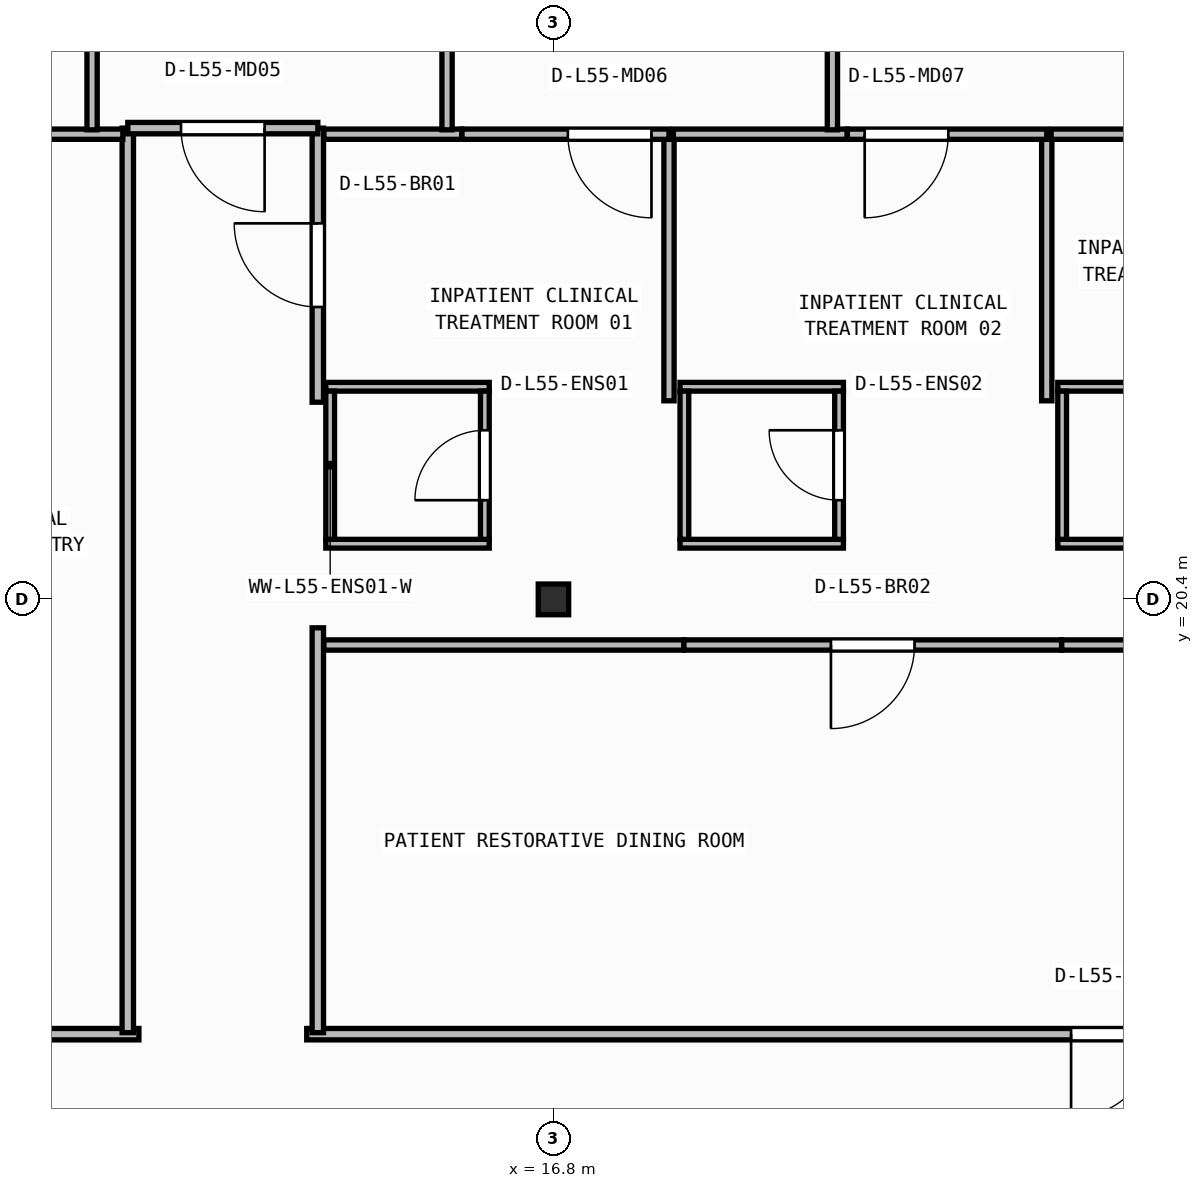
"""IFC4 building model, lengths in metres.
Left out: names, types, materials, properties, quantities, classifications, styles, units other than length and angle.
Written with IfcOpenShell. Run it as: python <this file> out.ifc"""

import sys

from ifc_helpers import new_model, si_unit, direction, frame, frame_2d, origin, origin_2d, place, context, subcontext, project, spatial, rectangle, i_section, extrude, element, fill, save


model = new_model("IFC4")
c1 = context("Model", 3, precision=1e-05, world=origin(), true_north=direction((0.0, 1.0)))
c2 = subcontext(c1, "Body", "Model", "MODEL_VIEW")
j1 = project(units=[si_unit("LENGTHUNIT", "METRE"), si_unit("PLANEANGLEUNIT", "RADIAN")], contexts=[c1])
p1 = place(None, origin())
s1 = spatial("IfcSite", under=j1, at=p1, CompositionType="ELEMENT")
p2 = place(p1, origin())
s2 = spatial("IfcBuilding", under=s1, at=p2, CompositionType="ELEMENT")
p3 = place(p2, frame((0.0, 0.0, 223.7)))
s3 = spatial("IfcBuildingStorey", under=s2, at=p3, CompositionType="ELEMENT", Elevation=223.7)
p4 = place(p3, frame((16.8, 20.4, 0.0), z_axis=(0.0, 0.0, 1.0), x_axis=(1.0, 0.0, 0.0)))
e1 = element("IfcColumn", 1, at=p4, inside=s3, PredefinedType="COLUMN", context=c2, shape_type="SweptSolid", body=[
    extrude(i_section(OverallWidth=0.4, OverallDepth=0.404, WebThickness=0.02, FlangeThickness=0.032, at=origin_2d()), origin(), (0.0, 0.0, 1.0), 3.95),
])
for number, where, z_axis, x_axis in (
    (2, (13.805, 21.133, 0.0), (0.0, 0.0, 1.0), (1.0, 0.0, 0.0)),
    (3, (13.805, 23.198, 0.0), (0.0, 0.0, 1.0), (1.0, 0.0, 0.0)),
):
    element("IfcWall", number, at=place(p3, frame(where, z_axis=z_axis, x_axis=x_axis)), inside=s3, PredefinedType="PARTITIONING", context=c2, shape_type="SweptSolid", body=[
        extrude(rectangle(XDim=2.15, YDim=0.115, at=frame_2d((1.075, 0.0))), origin(), (0.0, 0.0, 1.0), 3.71),
    ])
p5 = place(p3, frame((13.863, 21.19, 0.0), z_axis=(0.0, 0.0, 1.0), x_axis=(0.0, 1.0, 0.0)))
e4 = element("IfcWall", 4, at=p5, inside=s3, PredefinedType="PARTITIONING", context=c2, shape_type="SweptSolid", body=[
    extrude(rectangle(XDim=1.95, YDim=0.115, at=frame_2d((0.975, 0.0))), origin(), (0.0, 0.0, 1.0), 3.71),
])
p6 = place(p3, frame((15.897, 21.19, 0.0), z_axis=(0.0, 0.0, 1.0), x_axis=(0.0, 1.0, 0.0)))
e5 = element("IfcWall", 5, at=p6, inside=s3, PredefinedType="PARTITIONING", context=c2, shape_type="SweptSolid", body=[
    extrude(rectangle(XDim=1.95, YDim=0.115, at=frame_2d((0.975, 0.0))), origin(), (0.0, 0.0, 1.0), 3.71),
])
p7 = place(p6, frame((0.515, 0.0, 0.0)))
e6 = element("IfcOpeningElement", 6, at=p7, cuts=e5, PredefinedType="OPENING", context=c2, shape_type="SweptSolid", body=[
    extrude(rectangle(XDim=0.92, YDim=2.1, at=frame_2d((0.46, 1.05))), frame((0.0, 0.067, 0.0), z_axis=(0.0, -1.0, 0.0), x_axis=(1.0, 0.0, 0.0)), (0.0, 0.0, 1.0), 0.135),
])
for number, where, z_axis, x_axis in (
    (7, (18.465, 21.133, 0.0), (0.0, 0.0, 1.0), (1.0, 0.0, 0.0)),
    (8, (18.465, 23.198, 0.0), (0.0, 0.0, 1.0), (1.0, 0.0, 0.0)),
):
    element("IfcWall", number, at=place(p3, frame(where, z_axis=z_axis, x_axis=x_axis)), inside=s3, PredefinedType="PARTITIONING", context=c2, shape_type="SweptSolid", body=[
        extrude(rectangle(XDim=2.15, YDim=0.115, at=frame_2d((1.075, 0.0))), origin(), (0.0, 0.0, 1.0), 3.71),
    ])
p8 = place(p3, frame((18.522, 21.19, 0.0), z_axis=(0.0, 0.0, 1.0), x_axis=(0.0, 1.0, 0.0)))
e9 = element("IfcWall", 9, at=p8, inside=s3, PredefinedType="PARTITIONING", context=c2, shape_type="SweptSolid", body=[
    extrude(rectangle(XDim=1.95, YDim=0.115, at=frame_2d((0.975, 0.0))), origin(), (0.0, 0.0, 1.0), 3.71),
])
p9 = place(p3, frame((20.558, 21.19, 0.0), z_axis=(0.0, 0.0, 1.0), x_axis=(0.0, 1.0, 0.0)))
e10 = element("IfcWall", 10, at=p9, inside=s3, PredefinedType="PARTITIONING", context=c2, shape_type="SweptSolid", body=[
    extrude(rectangle(XDim=1.95, YDim=0.115, at=frame_2d((0.975, 0.0))), origin(), (0.0, 0.0, 1.0), 3.71),
])
p10 = place(p9, frame((0.515, 0.0, 0.0)))
e11 = element("IfcOpeningElement", 11, at=p10, cuts=e10, PredefinedType="OPENING", context=c2, shape_type="SweptSolid", body=[
    extrude(rectangle(XDim=0.92, YDim=2.1, at=frame_2d((0.46, 1.05))), frame((0.0, 0.067, 0.0), z_axis=(0.0, -1.0, 0.0), x_axis=(1.0, 0.0, 0.0)), (0.0, 0.0, 1.0), 0.135),
])
for number, where, z_axis, x_axis in (
    (12, (23.435, 21.133, 0.0), (0.0, 0.0, 1.0), (1.0, 0.0, 0.0)),
    (13, (23.435, 23.198, 0.0), (0.0, 0.0, 1.0), (1.0, 0.0, 0.0)),
):
    element("IfcWall", number, at=place(p3, frame(where, z_axis=z_axis, x_axis=x_axis)), inside=s3, PredefinedType="PARTITIONING", context=c2, shape_type="SweptSolid", body=[
        extrude(rectangle(XDim=2.15, YDim=0.115, at=frame_2d((1.075, 0.0))), origin(), (0.0, 0.0, 1.0), 3.71),
    ])
p11 = place(p3, frame((23.492, 21.19, 0.0), z_axis=(0.0, 0.0, 1.0), x_axis=(0.0, 1.0, 0.0)))
e14 = element("IfcWall", 14, at=p11, inside=s3, PredefinedType="PARTITIONING", context=c2, shape_type="SweptSolid", body=[
    extrude(rectangle(XDim=1.95, YDim=0.115, at=frame_2d((0.975, 0.0))), origin(), (0.0, 0.0, 1.0), 3.71),
])
p12 = place(p3, frame((11.346, 14.68, 0.0), z_axis=(0.0, 0.0, 1.0), x_axis=(-1.0, 0.0, 0.0)))
e15 = element("IfcWall", 15, at=p12, inside=s3, PredefinedType="PARTITIONING", context=c2, shape_type="SweptSolid", body=[
    extrude(rectangle(XDim=3.872, YDim=0.15, at=frame_2d((1.936, 0.0))), origin(), (0.0, 0.0, 1.0), 3.71),
])
p13 = place(p12, frame((1.386, 0.0, 0.0)))
e16 = element("IfcOpeningElement", 16, at=p13, cuts=e15, PredefinedType="OPENING", context=c2, shape_type="SweptSolid", body=[
    extrude(rectangle(XDim=1.1, YDim=2.1, at=frame_2d((0.55, 1.05))), frame((0.0, 0.085, 0.0), z_axis=(0.0, -1.0, 0.0), x_axis=(1.0, 0.0, 0.0)), (0.0, 0.0, 1.0), 0.17),
])
p14 = place(p3, frame((34.766, 14.68, 0.0), z_axis=(0.0, 0.0, 1.0), x_axis=(-1.0, 0.0, 0.0)))
e17 = element("IfcWall", 17, at=p14, inside=s3, PredefinedType="PARTITIONING", context=c2, shape_type="SweptSolid", body=[
    extrude(rectangle(XDim=21.212, YDim=0.15, at=frame_2d((10.606, 0.0))), origin(), (0.0, 0.0, 1.0), 3.71),
])
p15 = place(p14, frame((10.056, 0.0, 0.0)))
e18 = element("IfcOpeningElement", 18, at=p15, cuts=e17, PredefinedType="OPENING", context=c2, shape_type="SweptSolid", body=[
    extrude(rectangle(XDim=1.1, YDim=2.1, at=frame_2d((0.55, 1.05))), frame((0.0, 0.085, 0.0), z_axis=(0.0, -1.0, 0.0), x_axis=(1.0, 0.0, 0.0)), (0.0, 0.0, 1.0), 0.17),
])
p16 = place(p3, frame((11.2, 26.6, 0.0), z_axis=(0.0, 0.0, 1.0), x_axis=(0.0, -1.0, 0.0)))
e19 = element("IfcWall", 19, at=p16, inside=s3, PredefinedType="PARTITIONING", context=c2, shape_type="SweptSolid", body=[
    extrude(rectangle(XDim=11.9, YDim=0.15, at=frame_2d((5.95, 0.0))), origin(), (0.0, 0.0, 1.0), 3.71),
])
p17 = place(p3, frame((13.7, 14.7, 0.0), z_axis=(0.0, 0.0, 1.0), x_axis=(0.0, 1.0, 0.0)))
e20 = element("IfcWall", 20, at=p17, inside=s3, PredefinedType="PARTITIONING", context=c2, shape_type="SweptSolid", body=[
    extrude(rectangle(XDim=5.326, YDim=0.15, at=frame_2d((2.663, 0.0))), origin(), (0.0, 0.0, 1.0), 3.71),
])
p18 = place(p3, frame((13.7, 22.994, 0.0), z_axis=(0.0, 0.0, 1.0), x_axis=(0.0, 1.0, 0.0)))
e21 = element("IfcWall", 21, at=p18, inside=s3, PredefinedType="PARTITIONING", context=c2, shape_type="SweptSolid", body=[
    extrude(rectangle(XDim=3.606, YDim=0.15, at=frame_2d((1.803, 0.0))), origin(), (0.0, 0.0, 1.0), 3.71),
])
p19 = place(p18, frame((1.253, 0.0, 0.0)))
e22 = element("IfcOpeningElement", 22, at=p19, cuts=e21, PredefinedType="OPENING", context=c2, shape_type="SweptSolid", body=[
    extrude(rectangle(XDim=1.1, YDim=2.1, at=frame_2d((0.55, 1.05))), frame((0.0, 0.085, 0.0), z_axis=(0.0, -1.0, 0.0), x_axis=(1.0, 0.0, 0.0)), (0.0, 0.0, 1.0), 0.17),
])
p20 = place(p3, frame((13.7, 26.6, 0.0), z_axis=(0.0, 0.0, 1.0), x_axis=(-1.0, 0.0, 0.0)))
e23 = element("IfcWall", 23, at=p20, inside=s3, PredefinedType="PARTITIONING", context=c2, shape_type="SweptSolid", body=[
    extrude(rectangle(XDim=2.5, YDim=0.15, at=frame_2d((1.25, 0.0))), origin(), (0.0, 0.0, 1.0), 3.71),
])
p21 = place(p20, frame((0.7, 0.0, 0.0)))
e24 = element("IfcOpeningElement", 24, at=p21, cuts=e23, PredefinedType="OPENING", context=c2, shape_type="SweptSolid", body=[
    extrude(rectangle(XDim=1.1, YDim=2.1, at=frame_2d((0.55, 1.05))), frame((0.0, 0.085, 0.0), z_axis=(0.0, -1.0, 0.0), x_axis=(1.0, 0.0, 0.0)), (0.0, 0.0, 1.0), 0.17),
])
p22 = place(p3, frame((11.135, 26.52, 0.0), z_axis=(0.0, 0.0, 1.0), x_axis=(-1.0, 0.0, 0.0)))
e25 = element("IfcWall", 25, at=p22, inside=s3, PredefinedType="PARTITIONING", context=c2, shape_type="SweptSolid", body=[
    extrude(rectangle(XDim=3.498, YDim=0.135, at=frame_2d((1.749, 0.0))), origin(), (0.0, 0.0, 1.0), 3.71),
])
p23 = place(p3, frame((18.515, 19.8, 0.0), z_axis=(0.0, 0.0, 1.0), x_axis=(-1.0, 0.0, 0.0)))
e26 = element("IfcWall", 26, at=p23, inside=s3, PredefinedType="PARTITIONING", context=c2, shape_type="SweptSolid", body=[
    extrude(rectangle(XDim=4.735, YDim=0.135, at=frame_2d((2.367, 0.0))), origin(), (0.0, 0.0, 1.0), 3.71),
])
p24 = place(p3, frame((23.485, 19.8, 0.0), z_axis=(0.0, 0.0, 1.0), x_axis=(-1.0, 0.0, 0.0)))
e27 = element("IfcWall", 27, at=p24, inside=s3, PredefinedType="PARTITIONING", context=c2, shape_type="SweptSolid", body=[
    extrude(rectangle(XDim=4.968, YDim=0.135, at=frame_2d((2.484, 0.0))), origin(), (0.0, 0.0, 1.0), 3.71),
])
p25 = place(p24, frame((1.934, 0.0, 0.0)))
e28 = element("IfcOpeningElement", 28, at=p25, cuts=e27, PredefinedType="OPENING", context=c2, shape_type="SweptSolid", body=[
    extrude(rectangle(XDim=1.1, YDim=2.1, at=frame_2d((0.55, 1.05))), frame((0.0, 0.077, 0.0), z_axis=(0.0, -1.0, 0.0), x_axis=(1.0, 0.0, 0.0)), (0.0, 0.0, 1.0), 0.155),
])
p26 = place(p3, frame((27.715, 19.8, 0.0), z_axis=(0.0, 0.0, 1.0), x_axis=(-1.0, 0.0, 0.0)))
e29 = element("IfcWall", 29, at=p26, inside=s3, PredefinedType="PARTITIONING", context=c2, shape_type="SweptSolid", body=[
    extrude(rectangle(XDim=4.228, YDim=0.135, at=frame_2d((2.114, 0.0))), origin(), (0.0, 0.0, 1.0), 3.71),
])
p27 = place(p26, frame((0.271, 0.0, 0.0)))
e30 = element("IfcOpeningElement", 30, at=p27, cuts=e29, PredefinedType="OPENING", context=c2, shape_type="SweptSolid", body=[
    extrude(rectangle(XDim=0.98, YDim=2.1, at=frame_2d((0.49, 1.05))), frame((0.0, 0.077, 0.0), z_axis=(0.0, -1.0, 0.0), x_axis=(1.0, 0.0, 0.0)), (0.0, 0.0, 1.0), 0.155),
])
p28 = place(p3, frame((18.32, 23.012, 0.0), z_axis=(0.0, 0.0, 1.0), x_axis=(0.0, 1.0, 0.0)))
e31 = element("IfcWall", 31, at=p28, inside=s3, PredefinedType="PARTITIONING", context=c2, shape_type="SweptSolid", body=[
    extrude(rectangle(XDim=3.508, YDim=0.135, at=frame_2d((1.754, 0.0))), origin(), (0.0, 0.0, 1.0), 3.71),
])
p29 = place(p3, frame((15.594, 26.52, 0.0), z_axis=(0.0, 0.0, 1.0), x_axis=(-1.0, 0.0, 0.0)))
e32 = element("IfcWall", 32, at=p29, inside=s3, PredefinedType="PARTITIONING", context=c2, shape_type="SweptSolid", body=[
    extrude(rectangle(XDim=1.814, YDim=0.135, at=frame_2d((0.907, 0.0))), origin(), (0.0, 0.0, 1.0), 3.71),
])
p30 = place(p3, frame((18.32, 26.52, 0.0), z_axis=(0.0, 0.0, 1.0), x_axis=(-1.0, 0.0, 0.0)))
e33 = element("IfcWall", 33, at=p30, inside=s3, PredefinedType="PARTITIONING", context=c2, shape_type="SweptSolid", body=[
    extrude(rectangle(XDim=2.723, YDim=0.135, at=frame_2d((1.362, 0.0))), origin(), (0.0, 0.0, 1.0), 3.71),
])
p31 = place(p30, frame((0.231, 0.0, 0.0)))
e34 = element("IfcOpeningElement", 34, at=p31, cuts=e33, PredefinedType="OPENING", context=c2, shape_type="SweptSolid", body=[
    extrude(rectangle(XDim=1.1, YDim=2.1, at=frame_2d((0.55, 1.05))), frame((0.0, 0.077, 0.0), z_axis=(0.0, -1.0, 0.0), x_axis=(1.0, 0.0, 0.0)), (0.0, 0.0, 1.0), 0.155),
])
p32 = place(p3, frame((23.29, 23.012, 0.0), z_axis=(0.0, 0.0, 1.0), x_axis=(0.0, 1.0, 0.0)))
e35 = element("IfcWall", 35, at=p32, inside=s3, PredefinedType="PARTITIONING", context=c2, shape_type="SweptSolid", body=[
    extrude(rectangle(XDim=3.508, YDim=0.135, at=frame_2d((1.754, 0.0))), origin(), (0.0, 0.0, 1.0), 3.71),
])
p33 = place(p3, frame((20.665, 26.52, 0.0), z_axis=(0.0, 0.0, 1.0), x_axis=(-1.0, 0.0, 0.0)))
e36 = element("IfcWall", 36, at=p33, inside=s3, PredefinedType="PARTITIONING", context=c2, shape_type="SweptSolid", body=[
    extrude(rectangle(XDim=2.287, YDim=0.135, at=frame_2d((1.144, 0.0))), origin(), (0.0, 0.0, 1.0), 3.71),
])
p34 = place(p3, frame((23.29, 26.52, 0.0), z_axis=(0.0, 0.0, 1.0), x_axis=(-1.0, 0.0, 0.0)))
e37 = element("IfcWall", 37, at=p34, inside=s3, PredefinedType="PARTITIONING", context=c2, shape_type="SweptSolid", body=[
    extrude(rectangle(XDim=2.624, YDim=0.135, at=frame_2d((1.312, 0.0))), origin(), (0.0, 0.0, 1.0), 3.71),
])
p35 = place(p34, frame((1.295, 0.0, 0.0)))
e38 = element("IfcOpeningElement", 38, at=p35, cuts=e37, PredefinedType="OPENING", context=c2, shape_type="SweptSolid", body=[
    extrude(rectangle(XDim=1.1, YDim=2.1, at=frame_2d((0.55, 1.05))), frame((0.0, 0.077, 0.0), z_axis=(0.0, -1.0, 0.0), x_axis=(1.0, 0.0, 0.0)), (0.0, 0.0, 1.0), 0.155),
])
p36 = place(p3, frame((26.145, 26.52, 0.0), z_axis=(0.0, 0.0, 1.0), x_axis=(-1.0, 0.0, 0.0)))
e39 = element("IfcWall", 39, at=p36, inside=s3, PredefinedType="PARTITIONING", context=c2, shape_type="SweptSolid", body=[
    extrude(rectangle(XDim=2.797, YDim=0.135, at=frame_2d((1.398, 0.0))), origin(), (0.0, 0.0, 1.0), 3.71),
])
p37 = place(p3, frame((10.73, 26.577, 0.0), z_axis=(0.0, 0.0, 1.0), x_axis=(0.0, 1.0, 0.0)))
e40 = element("IfcWall", 40, at=p37, inside=s3, PredefinedType="PARTITIONING", context=c2, shape_type="SweptSolid", body=[
    extrude(rectangle(XDim=10.386, YDim=0.135, at=frame_2d((5.193, 0.0))), origin(), (0.0, 0.0, 1.0), 3.71),
])
p38 = place(p3, frame((15.4, 26.577, 0.0), z_axis=(0.0, 0.0, 1.0), x_axis=(0.0, 1.0, 0.0)))
e41 = element("IfcWall", 41, at=p38, inside=s3, PredefinedType="PARTITIONING", context=c2, shape_type="SweptSolid", body=[
    extrude(rectangle(XDim=8.149, YDim=0.135, at=frame_2d((4.075, 0.0))), origin(), (0.0, 0.0, 1.0), 3.71),
])
p39 = place(p3, frame((20.47, 26.577, 0.0), z_axis=(0.0, 0.0, 1.0), x_axis=(0.0, 1.0, 0.0)))
e42 = element("IfcWall", 42, at=p39, inside=s3, PredefinedType="PARTITIONING", context=c2, shape_type="SweptSolid", body=[
    extrude(rectangle(XDim=5.72, YDim=0.135, at=frame_2d((2.86, 0.0))), origin(), (0.0, 0.0, 1.0), 3.71),
])
p40 = place(p7, origin())
e43 = element("IfcDoor", 43, at=p40, inside=s3, OperationType="SINGLE_SWING_LEFT", PredefinedType="DOOR", context=c2, shape_type="SweptSolid", body=[
    extrude(rectangle(XDim=0.92, YDim=2.1, at=frame_2d((0.46, 1.05))), frame((0.0, 0.025, 0.0), z_axis=(0.0, -1.0, 0.0), x_axis=(1.0, 0.0, 0.0)), (0.0, 0.0, 1.0), 0.05),
])
fill(e6, e43)
p41 = place(p10, origin())
e44 = element("IfcDoor", 44, at=p41, inside=s3, OperationType="SINGLE_SWING_RIGHT", PredefinedType="DOOR", context=c2, shape_type="SweptSolid", body=[
    extrude(rectangle(XDim=0.92, YDim=2.1, at=frame_2d((0.46, 1.05))), frame((0.0, 0.025, 0.0), z_axis=(0.0, -1.0, 0.0), x_axis=(1.0, 0.0, 0.0)), (0.0, 0.0, 1.0), 0.05),
])
fill(e11, e44)
p42 = place(p15, origin())
e45 = element("IfcDoor", 45, at=p42, inside=s3, OperationType="SINGLE_SWING_RIGHT", PredefinedType="DOOR", context=c2, shape_type="SweptSolid", body=[
    extrude(rectangle(XDim=1.1, YDim=2.1, at=frame_2d((0.55, 1.05))), frame((0.0, 0.025, 0.0), z_axis=(0.0, -1.0, 0.0), x_axis=(1.0, 0.0, 0.0)), (0.0, 0.0, 1.0), 0.05),
])
fill(e18, e45)
p43 = place(p19, origin())
e46 = element("IfcDoor", 46, at=p43, inside=s3, OperationType="SINGLE_SWING_RIGHT", PredefinedType="DOOR", context=c2, shape_type="SweptSolid", body=[
    extrude(rectangle(XDim=1.1, YDim=2.1, at=frame_2d((0.55, 1.05))), frame((0.0, 0.025, 0.0), z_axis=(0.0, -1.0, 0.0), x_axis=(1.0, 0.0, 0.0)), (0.0, 0.0, 1.0), 0.05),
])
fill(e22, e46)
p44 = place(p21, origin())
e47 = element("IfcDoor", 47, at=p44, inside=s3, OperationType="SINGLE_SWING_LEFT", PredefinedType="DOOR", context=c2, shape_type="SweptSolid", body=[
    extrude(rectangle(XDim=1.1, YDim=2.1, at=frame_2d((0.55, 1.05))), frame((0.0, 0.025, 0.0), z_axis=(0.0, -1.0, 0.0), x_axis=(1.0, 0.0, 0.0)), (0.0, 0.0, 1.0), 0.05),
])
fill(e24, e47)
p45 = place(p25, origin())
e48 = element("IfcDoor", 48, at=p45, inside=s3, OperationType="SINGLE_SWING_RIGHT", PredefinedType="DOOR", context=c2, shape_type="SweptSolid", body=[
    extrude(rectangle(XDim=1.1, YDim=2.1, at=frame_2d((0.55, 1.05))), frame((0.0, 0.025, 0.0), z_axis=(0.0, -1.0, 0.0), x_axis=(1.0, 0.0, 0.0)), (0.0, 0.0, 1.0), 0.05),
])
fill(e28, e48)
p46 = place(p31, origin())
e49 = element("IfcDoor", 49, at=p46, inside=s3, OperationType="SINGLE_SWING_LEFT", PredefinedType="DOOR", context=c2, shape_type="SweptSolid", body=[
    extrude(rectangle(XDim=1.1, YDim=2.1, at=frame_2d((0.55, 1.05))), frame((0.0, 0.025, 0.0), z_axis=(0.0, -1.0, 0.0), x_axis=(1.0, 0.0, 0.0)), (0.0, 0.0, 1.0), 0.05),
])
fill(e34, e49)
p47 = place(p35, origin())
e50 = element("IfcDoor", 50, at=p47, inside=s3, OperationType="SINGLE_SWING_RIGHT", PredefinedType="DOOR", context=c2, shape_type="SweptSolid", body=[
    extrude(rectangle(XDim=1.1, YDim=2.1, at=frame_2d((0.55, 1.05))), frame((0.0, 0.025, 0.0), z_axis=(0.0, -1.0, 0.0), x_axis=(1.0, 0.0, 0.0)), (0.0, 0.0, 1.0), 0.05),
])
fill(e38, e50)
save(model, sys.argv[1])
